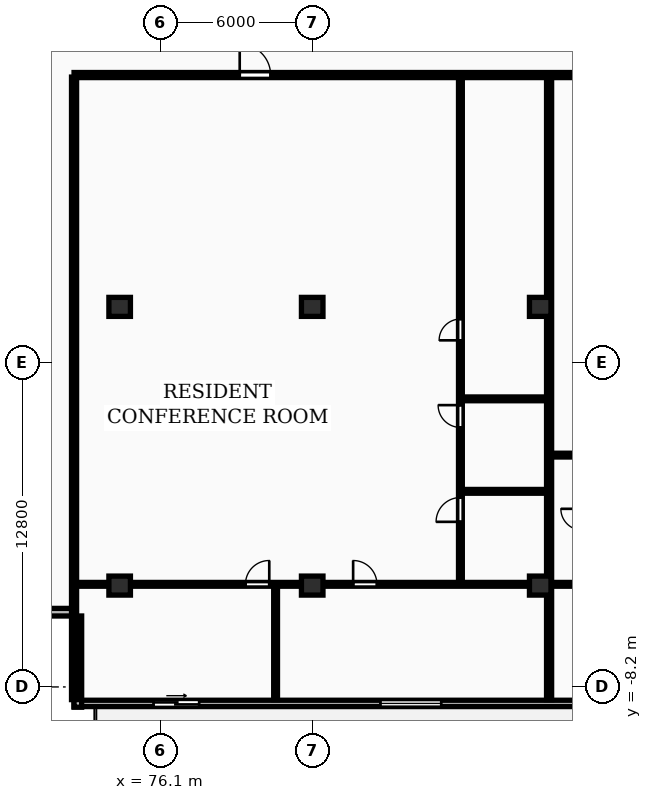
"""IFC4 building model, lengths in metres.
Left out: names, types, materials, properties, quantities, classifications, styles, units other than length and angle.
Written with IfcOpenShell. Run it as: python <this file> out.ifc"""

import sys

from ifc_helpers import new_model, si_unit, direction, frame, frame_2d, origin, origin_2d, place, context, subcontext, project, spatial, rectangle, extrude, element, fill, save


model = new_model("IFC4")
c1 = context("Model", 3, precision=1e-05, world=origin(), true_north=direction((0.0, 1.0)))
c2 = subcontext(c1, "Body", "Model", "MODEL_VIEW")
j1 = project(units=[si_unit("LENGTHUNIT", "METRE"), si_unit("PLANEANGLEUNIT", "RADIAN")], contexts=[c1])
p1 = place(None, origin())
s1 = spatial("IfcSite", under=j1, at=p1, CompositionType="ELEMENT")
p2 = place(p1, origin())
s2 = spatial("IfcBuilding", under=s1, at=p2, CompositionType="ELEMENT")
p3 = place(p2, frame((0.0, 0.0, 100.3)))
s3 = spatial("IfcBuildingStorey", under=s2, at=p3, CompositionType="ELEMENT", Elevation=100.3)
for number, where, z_axis, x_axis in (
    (1, (74.5, -4.2, 0.0), (0.0, 0.0, 1.0), (1.0, 0.0, 0.0)),
    (2, (74.5, 6.8, 0.0), (0.0, 0.0, 1.0), (1.0, 0.0, 0.0)),
    (3, (82.1, -4.2, 0.0), (0.0, 0.0, 1.0), (1.0, 0.0, 0.0)),
    (4, (82.1, 6.8, 0.0), (0.0, 0.0, 1.0), (1.0, 0.0, 0.0)),
    (5, (91.1, -4.2, 0.0), (0.0, 0.0, 1.0), (1.0, 0.0, 0.0)),
    (6, (91.1, 6.8, 0.0), (0.0, 0.0, 1.0), (1.0, 0.0, 0.0)),
):
    element("IfcColumn", number, at=place(p3, frame(where, z_axis=z_axis, x_axis=x_axis)), inside=s3, PredefinedType="COLUMN", context=c2, shape_type="SweptSolid", body=[
        extrude(rectangle(XDim=0.85, YDim=0.75, at=origin_2d()), origin(), (0.0, 0.0, 1.0), 3.25),
    ])
p4 = place(p3, frame((72.7, -8.85, 0.0), z_axis=(0.0, 0.0, 1.0), x_axis=(1.0, 0.0, 0.0)))
e7 = element("IfcWall", 7, at=p4, inside=s3, PredefinedType="STANDARD", context=c2, shape_type="SweptSolid", body=[
    extrude(rectangle(XDim=58.0, YDim=0.25, at=frame_2d((29.0, 0.0))), origin(), (0.0, 0.0, 1.0), 2.97),
])
p5 = place(p4, frame((3.137, 0.0, 0.0)))
e8 = element("IfcOpeningElement", 8, at=p5, cuts=e7, PredefinedType="OPENING", context=c2, shape_type="SweptSolid", body=[
    extrude(rectangle(XDim=1.8, YDim=2.2, at=frame_2d((0.9, 1.1))), frame((0.0, 0.135, 0.0), z_axis=(0.0, -1.0, 0.0), x_axis=(1.0, 0.0, 0.0)), (0.0, 0.0, 1.0), 0.27),
])
p6 = place(p4, frame((12.093, 0.0, 0.85)))
e9 = element("IfcOpeningElement", 9, at=p6, cuts=e7, PredefinedType="OPENING", context=c2, shape_type="SweptSolid", body=[
    extrude(rectangle(XDim=2.4, YDim=1.9, at=frame_2d((1.2, 0.95))), frame((0.0, 0.135, 0.0), z_axis=(0.0, -1.0, 0.0), x_axis=(1.0, 0.0, 0.0)), (0.0, 0.0, 1.0), 0.27),
])
p7 = place(p4, frame((22.913, 0.0, 0.0)))
e10 = element("IfcOpeningElement", 10, at=p7, cuts=e7, PredefinedType="OPENING", context=c2, shape_type="SweptSolid", body=[
    extrude(rectangle(XDim=1.8, YDim=2.2, at=frame_2d((0.9, 1.1))), frame((0.0, 0.135, 0.0), z_axis=(0.0, -1.0, 0.0), x_axis=(1.0, 0.0, 0.0)), (0.0, 0.0, 1.0), 0.27),
])
p8 = place(p4, frame((33.35, 0.0, 0.0)))
e11 = element("IfcOpeningElement", 11, at=p8, cuts=e7, PredefinedType="OPENING", context=c2, shape_type="SweptSolid", body=[
    extrude(rectangle(XDim=1.8, YDim=2.2, at=frame_2d((0.9, 1.1))), frame((0.0, 0.135, 0.0), z_axis=(0.0, -1.0, 0.0), x_axis=(1.0, 0.0, 0.0)), (0.0, 0.0, 1.0), 0.27),
])
p9 = place(p4, frame((49.275, 0.0, 0.85)))
e12 = element("IfcOpeningElement", 12, at=p9, cuts=e7, PredefinedType="OPENING", context=c2, shape_type="SweptSolid", body=[
    extrude(rectangle(XDim=2.4, YDim=1.9, at=frame_2d((1.2, 0.95))), frame((0.0, 0.135, 0.0), z_axis=(0.0, -1.0, 0.0), x_axis=(1.0, 0.0, 0.0)), (0.0, 0.0, 1.0), 0.27),
])
p10 = place(p4, frame((42.613, 0.0, 0.0)))
e13 = element("IfcOpeningElement", 13, at=p10, cuts=e7, PredefinedType="OPENING", context=c2, shape_type="SweptSolid", body=[
    extrude(rectangle(XDim=1.8, YDim=2.2, at=frame_2d((0.9, 1.1))), frame((0.0, 0.135, 0.0), z_axis=(0.0, -1.0, 0.0), x_axis=(1.0, 0.0, 0.0)), (0.0, 0.0, 1.0), 0.27),
])
p11 = place(p4, frame((54.575, 0.0, 0.85)))
e14 = element("IfcOpeningElement", 14, at=p11, cuts=e7, PredefinedType="OPENING", context=c2, shape_type="SweptSolid", body=[
    extrude(rectangle(XDim=2.4, YDim=1.9, at=frame_2d((1.2, 0.95))), frame((0.0, 0.135, 0.0), z_axis=(0.0, -1.0, 0.0), x_axis=(1.0, 0.0, 0.0)), (0.0, 0.0, 1.0), 0.27),
])
p12 = place(p3, frame((69.1, -5.25, 0.0), z_axis=(0.0, 0.0, 1.0), x_axis=(1.0, 0.0, 0.0)))
e15 = element("IfcWall", 15, at=p12, inside=s3, PredefinedType="STANDARD", context=c2, shape_type="SweptSolid", body=[
    extrude(rectangle(XDim=3.6, YDim=0.3, at=frame_2d((1.8, 0.0))), origin(), (0.0, 0.0, 1.0), 2.97),
])
p13 = place(p3, frame((72.85, -5.4, 0.0), z_axis=(0.0, 0.0, 1.0), x_axis=(0.0, -1.0, 0.0)))
e16 = element("IfcWall", 16, at=p13, inside=s3, PredefinedType="STANDARD", context=c2, shape_type="SweptSolid", body=[
    extrude(rectangle(XDim=3.6, YDim=0.3, at=frame_2d((1.8, 0.0))), origin(), (0.0, 0.0, 1.0), 2.97),
])
for number, where, z_axis, x_axis in (
    (17, (72.7, -8.7, 0.0), (0.0, 0.0, 1.0), (0.0, 1.0, 0.0)),
    (18, (91.45, -8.7, 0.0), (0.0, 0.0, 1.0), (0.0, 1.0, 0.0)),
):
    element("IfcWall", number, at=place(p3, frame(where, z_axis=z_axis, x_axis=x_axis)), inside=s3, PredefinedType="PARTITIONING", context=c2, shape_type="SweptSolid", body=[
        extrude(rectangle(XDim=24.57, YDim=0.2, at=frame_2d((12.285, 0.0))), origin(), (0.0, 0.0, 1.0), 2.97),
    ])
for number, where, z_axis, x_axis in (
    (19, (88.01, -0.48, 0.0), (0.0, 0.0, 1.0), (1.0, 0.0, 0.0)),
    (20, (88.01, 3.17, 0.0), (0.0, 0.0, 1.0), (1.0, 0.0, 0.0)),
):
    element("IfcWall", number, at=place(p3, frame(where, z_axis=z_axis, x_axis=x_axis)), inside=s3, PredefinedType="PARTITIONING", context=c2, shape_type="SweptSolid", body=[
        extrude(rectangle(XDim=3.36, YDim=0.15, at=frame_2d((1.68, 0.0))), origin(), (0.0, 0.0, 1.0), 2.97),
    ])
p14 = place(p3, frame((87.95, -4.09, 0.0), z_axis=(0.0, 0.0, 1.0), x_axis=(0.0, 1.0, 0.0)))
e21 = element("IfcWall", 21, at=p14, inside=s3, PredefinedType="PARTITIONING", context=c2, shape_type="SweptSolid", body=[
    extrude(rectangle(XDim=19.98, YDim=0.15, at=frame_2d((9.99, 0.0))), origin(), (0.0, 0.0, 1.0), 2.97),
])
p15 = place(p14, frame((2.406, 0.0, 0.0)))
e22 = element("IfcOpeningElement", 22, at=p15, cuts=e21, PredefinedType="OPENING", context=c2, shape_type="SweptSolid", body=[
    extrude(rectangle(XDim=0.96, YDim=2.1, at=frame_2d((0.48, 1.05))), frame((0.0, 0.085, 0.0), z_axis=(0.0, -1.0, 0.0), x_axis=(1.0, 0.0, 0.0)), (0.0, 0.0, 1.0), 0.17),
])
p16 = place(p14, frame((6.133, 0.0, 0.0)))
e23 = element("IfcOpeningElement", 23, at=p16, cuts=e21, PredefinedType="OPENING", context=c2, shape_type="SweptSolid", body=[
    extrude(rectangle(XDim=0.88, YDim=2.06, at=frame_2d((0.44, 1.03))), frame((0.0, 0.085, 0.0), z_axis=(0.0, -1.0, 0.0), x_axis=(1.0, 0.0, 0.0)), (0.0, 0.0, 1.0), 0.17),
])
p17 = place(p14, frame((9.57, 0.0, 0.0)))
e24 = element("IfcOpeningElement", 24, at=p17, cuts=e21, PredefinedType="OPENING", context=c2, shape_type="SweptSolid", body=[
    extrude(rectangle(XDim=0.84, YDim=2.04, at=frame_2d((0.42, 1.02))), frame((0.0, 0.085, 0.0), z_axis=(0.0, -1.0, 0.0), x_axis=(1.0, 0.0, 0.0)), (0.0, 0.0, 1.0), 0.17),
])
p18 = place(p3, frame((80.655, -8.7, 0.0), z_axis=(0.0, 0.0, 1.0), x_axis=(0.0, 1.0, 0.0)))
e25 = element("IfcWall", 25, at=p18, inside=s3, PredefinedType="PARTITIONING", context=c2, shape_type="SweptSolid", body=[
    extrude(rectangle(XDim=4.47, YDim=0.15, at=frame_2d((2.235, 0.0))), origin(), (0.0, 0.0, 1.0), 2.97),
])
p19 = place(p3, frame((72.78, -4.15, 0.0), z_axis=(0.0, 0.0, 1.0), x_axis=(1.0, 0.0, 0.0)))
e26 = element("IfcWall", 26, at=p19, inside=s3, PredefinedType="PARTITIONING", context=c2, shape_type="SweptSolid", body=[
    extrude(rectangle(XDim=18.59, YDim=0.15, at=frame_2d((9.295, 0.0))), origin(), (0.0, 0.0, 1.0), 2.663),
])
p20 = place(p19, frame((6.685, 0.0, 0.0)))
e27 = element("IfcOpeningElement", 27, at=p20, cuts=e26, PredefinedType="OPENING", context=c2, shape_type="SweptSolid", body=[
    extrude(rectangle(XDim=0.94, YDim=2.1, at=frame_2d((0.47, 1.05))), frame((0.0, 0.085, 0.0), z_axis=(0.0, -1.0, 0.0), x_axis=(1.0, 0.0, 0.0)), (0.0, 0.0, 1.0), 0.17),
])
p21 = place(p19, frame((10.935, 0.0, 0.0)))
e28 = element("IfcOpeningElement", 28, at=p21, cuts=e26, PredefinedType="OPENING", context=c2, shape_type="SweptSolid", body=[
    extrude(rectangle(XDim=0.94, YDim=2.1, at=frame_2d((0.47, 1.05))), frame((0.0, 0.085, 0.0), z_axis=(0.0, -1.0, 0.0), x_axis=(1.0, 0.0, 0.0)), (0.0, 0.0, 1.0), 0.17),
])
p22 = place(p3, frame((91.53, 0.95, 0.0), z_axis=(0.0, 0.0, 1.0), x_axis=(1.0, 0.0, 0.0)))
e29 = element("IfcWall", 29, at=p22, inside=s3, PredefinedType="PARTITIONING", context=c2, shape_type="SweptSolid", body=[
    extrude(rectangle(XDim=9.965, YDim=0.15, at=frame_2d((4.982, 0.0))), origin(), (0.0, 0.0, 1.0), 2.97),
])
p23 = place(p22, frame((4.522, 0.0, 0.0)))
e30 = element("IfcOpeningElement", 30, at=p23, cuts=e29, PredefinedType="OPENING", context=c2, shape_type="SweptSolid", body=[
    extrude(rectangle(XDim=0.92, YDim=2.08, at=frame_2d((0.46, 1.04))), frame((0.0, 0.085, 0.0), z_axis=(0.0, -1.0, 0.0), x_axis=(1.0, 0.0, 0.0)), (0.0, 0.0, 1.0), 0.17),
])
p24 = place(p3, frame((91.53, -4.15, 0.0), z_axis=(0.0, 0.0, 1.0), x_axis=(1.0, 0.0, 0.0)))
e31 = element("IfcWall", 31, at=p24, inside=s3, PredefinedType="PARTITIONING", context=c2, shape_type="SweptSolid", body=[
    extrude(rectangle(XDim=9.965, YDim=0.15, at=frame_2d((4.982, 0.0))), origin(), (0.0, 0.0, 1.0), 2.663),
])
p25 = place(p24, frame((4.522, 0.0, 0.0)))
e32 = element("IfcOpeningElement", 32, at=p25, cuts=e31, PredefinedType="OPENING", context=c2, shape_type="SweptSolid", body=[
    extrude(rectangle(XDim=0.92, YDim=2.08, at=frame_2d((0.46, 1.04))), frame((0.0, 0.085, 0.0), z_axis=(0.0, -1.0, 0.0), x_axis=(1.0, 0.0, 0.0)), (0.0, 0.0, 1.0), 0.17),
])
p26 = place(p3, frame((72.7, 15.95, 0.0), z_axis=(0.0, 0.0, 1.0), x_axis=(1.0, 0.0, 0.0)))
e33 = element("IfcWall", 33, at=p26, inside=s3, PredefinedType="PARTITIONING", context=c2, shape_type="SweptSolid", body=[
    extrude(rectangle(XDim=58.0, YDim=0.2, at=frame_2d((29.0, 0.0))), origin(), (0.0, 0.0, 1.0), 2.97),
])
p27 = place(p26, frame((6.539, 0.0, 0.0)))
e34 = element("IfcOpeningElement", 34, at=p27, cuts=e33, PredefinedType="OPENING", context=c2, shape_type="SweptSolid", body=[
    extrude(rectangle(XDim=1.22, YDim=2.18, at=frame_2d((0.61, 1.09))), frame((0.0, 0.11, 0.0), z_axis=(0.0, -1.0, 0.0), x_axis=(1.0, 0.0, 0.0)), (0.0, 0.0, 1.0), 0.22),
])
p28 = place(p26, frame((20.795, 0.0, 0.0)))
e35 = element("IfcOpeningElement", 35, at=p28, cuts=e33, PredefinedType="OPENING", context=c2, shape_type="SweptSolid", body=[
    extrude(rectangle(XDim=0.95, YDim=2.15, at=frame_2d((0.475, 1.075))), frame((0.0, 0.11, 0.0), z_axis=(0.0, -1.0, 0.0), x_axis=(1.0, 0.0, 0.0)), (0.0, 0.0, 1.0), 0.22),
])
p29 = place(p26, frame((30.92, 0.0, 0.0)))
e36 = element("IfcOpeningElement", 36, at=p29, cuts=e33, PredefinedType="OPENING", context=c2, shape_type="SweptSolid", body=[
    extrude(rectangle(XDim=0.95, YDim=2.15, at=frame_2d((0.475, 1.075))), frame((0.0, 0.11, 0.0), z_axis=(0.0, -1.0, 0.0), x_axis=(1.0, 0.0, 0.0)), (0.0, 0.0, 1.0), 0.22),
])
p30 = place(p26, frame((41.67, 0.0, 0.0)))
e37 = element("IfcOpeningElement", 37, at=p30, cuts=e33, PredefinedType="OPENING", context=c2, shape_type="SweptSolid", body=[
    extrude(rectangle(XDim=0.95, YDim=2.15, at=frame_2d((0.475, 1.075))), frame((0.0, 0.11, 0.0), z_axis=(0.0, -1.0, 0.0), x_axis=(1.0, 0.0, 0.0)), (0.0, 0.0, 1.0), 0.22),
])
p31 = place(p5, origin())
e38 = element("IfcDoor", 38, at=p31, inside=s3, OperationType="SLIDING_TO_RIGHT", PredefinedType="DOOR", context=c2, shape_type="SweptSolid", body=[
    extrude(rectangle(XDim=1.8, YDim=2.2, at=frame_2d((0.9, 1.1))), frame((0.0, 0.025, 0.0), z_axis=(0.0, -1.0, 0.0), x_axis=(1.0, 0.0, 0.0)), (0.0, 0.0, 1.0), 0.05),
])
fill(e8, e38)
p32 = place(p6, origin())
e39 = element("IfcWindow", 39, at=p32, inside=s3, PartitioningType="DOUBLE_PANEL_VERTICAL", PredefinedType="WINDOW", context=c2, shape_type="SweptSolid", body=[
    extrude(rectangle(XDim=2.4, YDim=1.9, at=frame_2d((1.2, 0.95))), frame((0.0, 0.03, 0.0), z_axis=(0.0, -1.0, 0.0), x_axis=(1.0, 0.0, 0.0)), (0.0, 0.0, 1.0), 0.06),
])
fill(e9, e39)
p33 = place(p15, origin())
e40 = element("IfcDoor", 40, at=p33, inside=s3, OperationType="SINGLE_SWING_LEFT", PredefinedType="DOOR", context=c2, shape_type="SweptSolid", body=[
    extrude(rectangle(XDim=0.96, YDim=2.1, at=frame_2d((0.48, 1.05))), frame((0.0, 0.025, 0.0), z_axis=(0.0, -1.0, 0.0), x_axis=(1.0, 0.0, 0.0)), (0.0, 0.0, 1.0), 0.05),
])
fill(e22, e40)
p34 = place(p16, origin())
e41 = element("IfcDoor", 41, at=p34, inside=s3, OperationType="SINGLE_SWING_RIGHT", PredefinedType="DOOR", context=c2, shape_type="SweptSolid", body=[
    extrude(rectangle(XDim=0.88, YDim=2.06, at=frame_2d((0.44, 1.03))), frame((0.0, 0.025, 0.0), z_axis=(0.0, -1.0, 0.0), x_axis=(1.0, 0.0, 0.0)), (0.0, 0.0, 1.0), 0.05),
])
fill(e23, e41)
p35 = place(p17, origin())
e42 = element("IfcDoor", 42, at=p35, inside=s3, OperationType="SINGLE_SWING_LEFT", PredefinedType="DOOR", context=c2, shape_type="SweptSolid", body=[
    extrude(rectangle(XDim=0.84, YDim=2.04, at=frame_2d((0.42, 1.02))), frame((0.0, 0.025, 0.0), z_axis=(0.0, -1.0, 0.0), x_axis=(1.0, 0.0, 0.0)), (0.0, 0.0, 1.0), 0.05),
])
fill(e24, e42)
p36 = place(p20, origin())
e43 = element("IfcDoor", 43, at=p36, inside=s3, OperationType="SINGLE_SWING_RIGHT", PredefinedType="DOOR", context=c2, shape_type="SweptSolid", body=[
    extrude(rectangle(XDim=0.94, YDim=2.1, at=frame_2d((0.47, 1.05))), frame((0.0, 0.025, 0.0), z_axis=(0.0, -1.0, 0.0), x_axis=(1.0, 0.0, 0.0)), (0.0, 0.0, 1.0), 0.05),
])
fill(e27, e43)
p37 = place(p21, origin())
e44 = element("IfcDoor", 44, at=p37, inside=s3, OperationType="SINGLE_SWING_LEFT", PredefinedType="DOOR", context=c2, shape_type="SweptSolid", body=[
    extrude(rectangle(XDim=0.94, YDim=2.1, at=frame_2d((0.47, 1.05))), frame((0.0, 0.025, 0.0), z_axis=(0.0, -1.0, 0.0), x_axis=(1.0, 0.0, 0.0)), (0.0, 0.0, 1.0), 0.05),
])
fill(e28, e44)
p38 = place(p27, origin())
e45 = element("IfcDoor", 45, at=p38, inside=s3, OperationType="SINGLE_SWING_LEFT", PredefinedType="DOOR", context=c2, shape_type="SweptSolid", body=[
    extrude(rectangle(XDim=1.22, YDim=2.18, at=frame_2d((0.61, 1.09))), frame((0.0, 0.025, 0.0), z_axis=(0.0, -1.0, 0.0), x_axis=(1.0, 0.0, 0.0)), (0.0, 0.0, 1.0), 0.05),
])
fill(e34, e45)
save(model, sys.argv[1])
